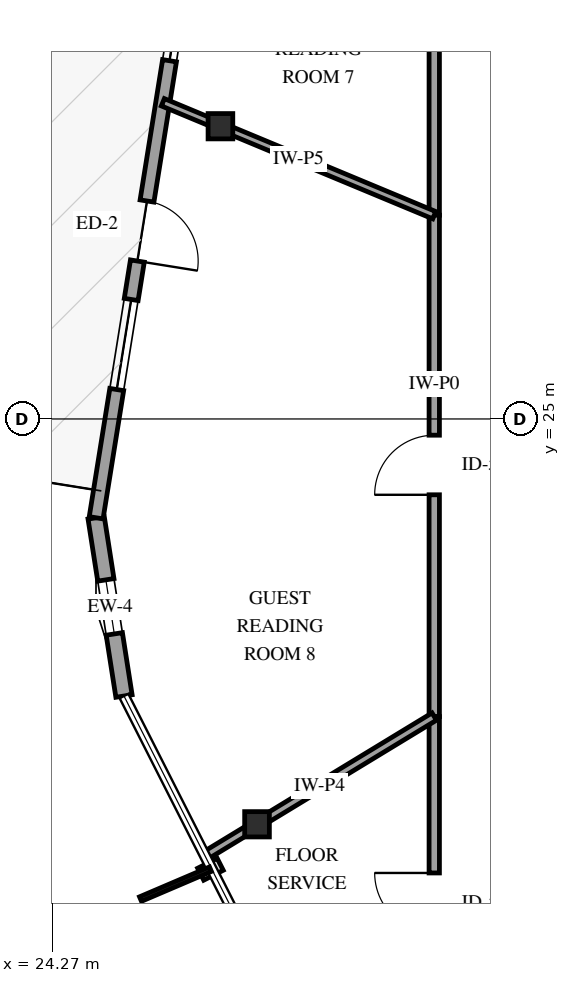
"""IFC4 building model, lengths in metres.
Left out: names, types, materials, properties, quantities, classifications, styles, units other than length and angle.
Written with IfcOpenShell. Run it as: python <this file> out.ifc"""

import sys

from ifc_helpers import new_model, si_unit, direction, frame, frame_2d, origin, origin_2d, place, context, subcontext, project, spatial, rectangle, i_section, extrude, element, fill, save


model = new_model("IFC4")
c1 = context("Model", 3, precision=1e-05, world=origin(), true_north=direction((0.0, 1.0)))
c2 = subcontext(c1, "Body", "Model", "MODEL_VIEW")
j1 = project(units=[si_unit("LENGTHUNIT", "METRE"), si_unit("PLANEANGLEUNIT", "RADIAN")], contexts=[c1])
p1 = place(None, origin())
s1 = spatial("IfcSite", under=j1, at=p1, CompositionType="ELEMENT")
p2 = place(p1, origin())
s2 = spatial("IfcBuilding", under=s1, at=p2, CompositionType="ELEMENT")
p3 = place(p2, frame((0.0, 0.0, 197.8)))
s3 = spatial("IfcBuildingStorey", under=s2, at=p3, CompositionType="ELEMENT", Elevation=197.8)
for number, where, z_axis, x_axis in (
    (1, (27.034, 29.814, 0.0), (0.0, 0.0, 1.0), (1.0, 0.0, 0.0)),
    (2, (27.635, 18.334, 0.0), (0.0, 0.0, 1.0), (1.0, 0.0, 0.0)),
):
    element("IfcColumn", number, at=place(p3, frame(where, z_axis=z_axis, x_axis=x_axis)), inside=s3, PredefinedType="COLUMN", context=c2, shape_type="SweptSolid", body=[
        extrude(i_section(OverallWidth=0.406, OverallDepth=0.416, WebThickness=0.03, FlangeThickness=0.048, FilletRadius=0.038, at=origin_2d()), origin(), (0.0, 0.0, 1.0), 3.6),
    ])
p4 = place(p3, frame((24.99, 23.375, 0.0), z_axis=(0.0, 0.0, 1.0), x_axis=(0.154301567716, -0.988023798398, 0.0)))
e3 = element("IfcWall", 3, at=p4, inside=s3, PredefinedType="SOLIDWALL", context=c2, shape_type="SweptSolid", body=[
    extrude(rectangle(XDim=2.967, YDim=0.27, at=frame_2d((1.483, 0.0))), origin(), (0.0, 0.0, 1.0), 2.679),
])
p5 = place(p4, frame((1.033, 0.0, 0.75)))
e4 = element("IfcOpeningElement", 4, at=p5, cuts=e3, PredefinedType="OPENING", context=c2, shape_type="SweptSolid", body=[
    extrude(rectangle(XDim=0.9, YDim=1.5, at=frame_2d((0.45, 0.75))), frame((0.0, 0.145, 0.0), z_axis=(0.0, -1.0, 0.0), x_axis=(1.0, 0.0, 0.0)), (0.0, 0.0, 1.0), 0.29),
])
p6 = place(p3, frame((26.504, 32.807, 0.0), z_axis=(0.0, 0.0, 1.0), x_axis=(-0.158485894053, -0.987361241586, 0.0)))
e5 = element("IfcWall", 5, at=p6, inside=s3, PredefinedType="SOLIDWALL", context=c2, shape_type="SweptSolid", body=[
    extrude(rectangle(XDim=9.552, YDim=0.23, at=frame_2d((4.776, 0.0))), origin(), (0.0, 0.0, 1.0), 2.679),
])
p7 = place(p6, frame((4.276, 0.0, 0.0)))
e6 = element("IfcOpeningElement", 6, at=p7, cuts=e5, PredefinedType="OPENING", context=c2, shape_type="SweptSolid", body=[
    extrude(rectangle(XDim=1.0, YDim=2.15, at=frame_2d((0.5, 1.075))), frame((0.0, 0.125, 0.0), z_axis=(0.0, -1.0, 0.0), x_axis=(1.0, 0.0, 0.0)), (0.0, 0.0, 1.0), 0.25),
])
p8 = place(p6, frame((0.44, 0.0, 0.72)))
e7 = element("IfcOpeningElement", 7, at=p8, cuts=e5, PredefinedType="OPENING", context=c2, shape_type="SweptSolid", body=[
    extrude(rectangle(XDim=1.5, YDim=1.7, at=frame_2d((0.75, 0.85))), frame((0.0, 0.125, 0.0), z_axis=(0.0, -1.0, 0.0), x_axis=(1.0, 0.0, 0.0)), (0.0, 0.0, 1.0), 0.25),
])
p9 = place(p6, frame((5.916, 0.0, 0.72)))
e8 = element("IfcOpeningElement", 8, at=p9, cuts=e5, PredefinedType="OPENING", context=c2, shape_type="SweptSolid", body=[
    extrude(rectangle(XDim=1.5, YDim=1.7, at=frame_2d((0.75, 0.85))), frame((0.0, 0.125, 0.0), z_axis=(0.0, -1.0, 0.0), x_axis=(1.0, 0.0, 0.0)), (0.0, 0.0, 1.0), 0.25),
])
p10 = place(p3, frame((30.55, 28.351, 0.0), z_axis=(0.0, 0.0, 1.0), x_axis=(0.0, 1.0, 0.0)))
e9 = element("IfcWall", 9, at=p10, inside=s3, PredefinedType="PARTITIONING", context=c2, shape_type="SweptSolid", body=[
    extrude(rectangle(XDim=9.778, YDim=0.17, at=frame_2d((4.889, 0.0))), origin(), (0.0, 0.0, 1.0), 3.3),
])
p11 = place(p10, frame((4.414, 0.0, 0.0)))
e10 = element("IfcOpeningElement", 10, at=p11, cuts=e9, PredefinedType="OPENING", context=c2, shape_type="SweptSolid", body=[
    extrude(rectangle(XDim=0.98, YDim=2.15, at=frame_2d((0.49, 1.075))), frame((0.0, 0.095, 0.0), z_axis=(0.0, -1.0, 0.0), x_axis=(1.0, 0.0, 0.0)), (0.0, 0.0, 1.0), 0.19),
])
p12 = place(p3, frame((30.55, 20.106, 0.0), z_axis=(0.0, 0.0, 1.0), x_axis=(0.0, 1.0, 0.0)))
e11 = element("IfcWall", 11, at=p12, inside=s3, PredefinedType="PARTITIONING", context=c2, shape_type="SweptSolid", body=[
    extrude(rectangle(XDim=8.245, YDim=0.17, at=frame_2d((4.123, 0.0))), origin(), (0.0, 0.0, 1.0), 3.3),
])
p13 = place(p12, frame((3.647, 0.0, 0.0)))
e12 = element("IfcOpeningElement", 12, at=p13, cuts=e11, PredefinedType="OPENING", context=c2, shape_type="SweptSolid", body=[
    extrude(rectangle(XDim=0.98, YDim=2.15, at=frame_2d((0.49, 1.075))), frame((0.0, 0.095, 0.0), z_axis=(0.0, -1.0, 0.0), x_axis=(1.0, 0.0, 0.0)), (0.0, 0.0, 1.0), 0.19),
])
p14 = place(p3, frame((30.55, 13.951, 0.0), z_axis=(0.0, 0.0, 1.0), x_axis=(0.0, 1.0, 0.0)))
e13 = element("IfcWall", 13, at=p14, inside=s3, PredefinedType="PARTITIONING", context=c2, shape_type="SweptSolid", body=[
    extrude(rectangle(XDim=6.155, YDim=0.17, at=frame_2d((3.078, 0.0))), origin(), (0.0, 0.0, 1.0), 3.3),
])
p15 = place(p14, frame((2.603, 0.0, 0.0)))
e14 = element("IfcOpeningElement", 14, at=p15, cuts=e13, PredefinedType="OPENING", context=c2, shape_type="SweptSolid", body=[
    extrude(rectangle(XDim=0.98, YDim=2.15, at=frame_2d((0.49, 1.075))), frame((0.0, 0.095, 0.0), z_axis=(0.0, -1.0, 0.0), x_axis=(1.0, 0.0, 0.0)), (0.0, 0.0, 1.0), 0.19),
])
p16 = place(p3, frame((30.55, 28.351, 0.0), z_axis=(0.0, 0.0, 1.0), x_axis=(-0.923275531176, 0.384138378104, 0.0)))
e15 = element("IfcWall", 15, at=p16, inside=s3, PredefinedType="PARTITIONING", context=c2, shape_type="SweptSolid", body=[
    extrude(rectangle(XDim=4.834, YDim=0.13, at=frame_2d((2.417, 0.0))), origin(), (0.0, 0.0, 1.0), 3.3),
])
p17 = place(p3, frame((30.55, 20.106, 0.0), z_axis=(0.0, 0.0, 1.0), x_axis=(-0.854578769062, -0.519321795679, 0.0)))
e16 = element("IfcWall", 16, at=p17, inside=s3, PredefinedType="PARTITIONING", context=c2, shape_type="SweptSolid", body=[
    extrude(rectangle(XDim=4.412, YDim=0.14, at=frame_2d((2.206, 0.0))), origin(), (0.0, 0.0, 1.0), 3.3),
])
p18 = place(p5, origin())
e17 = element("IfcWindow", 17, at=p18, inside=s3, PartitioningType="SINGLE_PANEL", PredefinedType="WINDOW", context=c2, shape_type="SweptSolid", body=[
    extrude(rectangle(XDim=0.9, YDim=1.5, at=frame_2d((0.45, 0.75))), frame((0.0, 0.03, 0.0), z_axis=(0.0, -1.0, 0.0), x_axis=(1.0, 0.0, 0.0)), (0.0, 0.0, 1.0), 0.06),
])
fill(e4, e17)
p19 = place(p7, origin())
e18 = element("IfcDoor", 18, at=p19, inside=s3, OperationType="SINGLE_SWING_RIGHT", PredefinedType="DOOR", context=c2, shape_type="SweptSolid", body=[
    extrude(rectangle(XDim=1.0, YDim=2.15, at=frame_2d((0.5, 1.075))), frame((0.0, 0.025, 0.0), z_axis=(0.0, -1.0, 0.0), x_axis=(1.0, 0.0, 0.0)), (0.0, 0.0, 1.0), 0.05),
])
fill(e6, e18)
p20 = place(p8, origin())
e19 = element("IfcWindow", 19, at=p20, inside=s3, PartitioningType="SINGLE_PANEL", PredefinedType="WINDOW", context=c2, shape_type="SweptSolid", body=[
    extrude(rectangle(XDim=1.5, YDim=1.7, at=frame_2d((0.75, 0.85))), frame((0.0, 0.03, 0.0), z_axis=(0.0, -1.0, 0.0), x_axis=(1.0, 0.0, 0.0)), (0.0, 0.0, 1.0), 0.06),
])
fill(e7, e19)
p21 = place(p9, origin())
e20 = element("IfcWindow", 20, at=p21, inside=s3, PartitioningType="SINGLE_PANEL", PredefinedType="WINDOW", context=c2, shape_type="SweptSolid", body=[
    extrude(rectangle(XDim=1.5, YDim=1.7, at=frame_2d((0.75, 0.85))), frame((0.0, 0.03, 0.0), z_axis=(0.0, -1.0, 0.0), x_axis=(1.0, 0.0, 0.0)), (0.0, 0.0, 1.0), 0.06),
])
fill(e8, e20)
p22 = place(p13, origin())
e21 = element("IfcDoor", 21, at=p22, inside=s3, OperationType="SINGLE_SWING_LEFT", PredefinedType="DOOR", context=c2, shape_type="SweptSolid", body=[
    extrude(rectangle(XDim=0.98, YDim=2.15, at=frame_2d((0.49, 1.075))), frame((0.0, 0.025, 0.0), z_axis=(0.0, -1.0, 0.0), x_axis=(1.0, 0.0, 0.0)), (0.0, 0.0, 1.0), 0.05),
])
fill(e12, e21)
p23 = place(p15, origin())
e22 = element("IfcDoor", 22, at=p23, inside=s3, OperationType="SINGLE_SWING_RIGHT", PredefinedType="DOOR", context=c2, shape_type="SweptSolid", body=[
    extrude(rectangle(XDim=0.98, YDim=2.15, at=frame_2d((0.49, 1.075))), frame((0.0, 0.025, 0.0), z_axis=(0.0, -1.0, 0.0), x_axis=(1.0, 0.0, 0.0)), (0.0, 0.0, 1.0), 0.05),
])
fill(e14, e22)
save(model, sys.argv[1])
